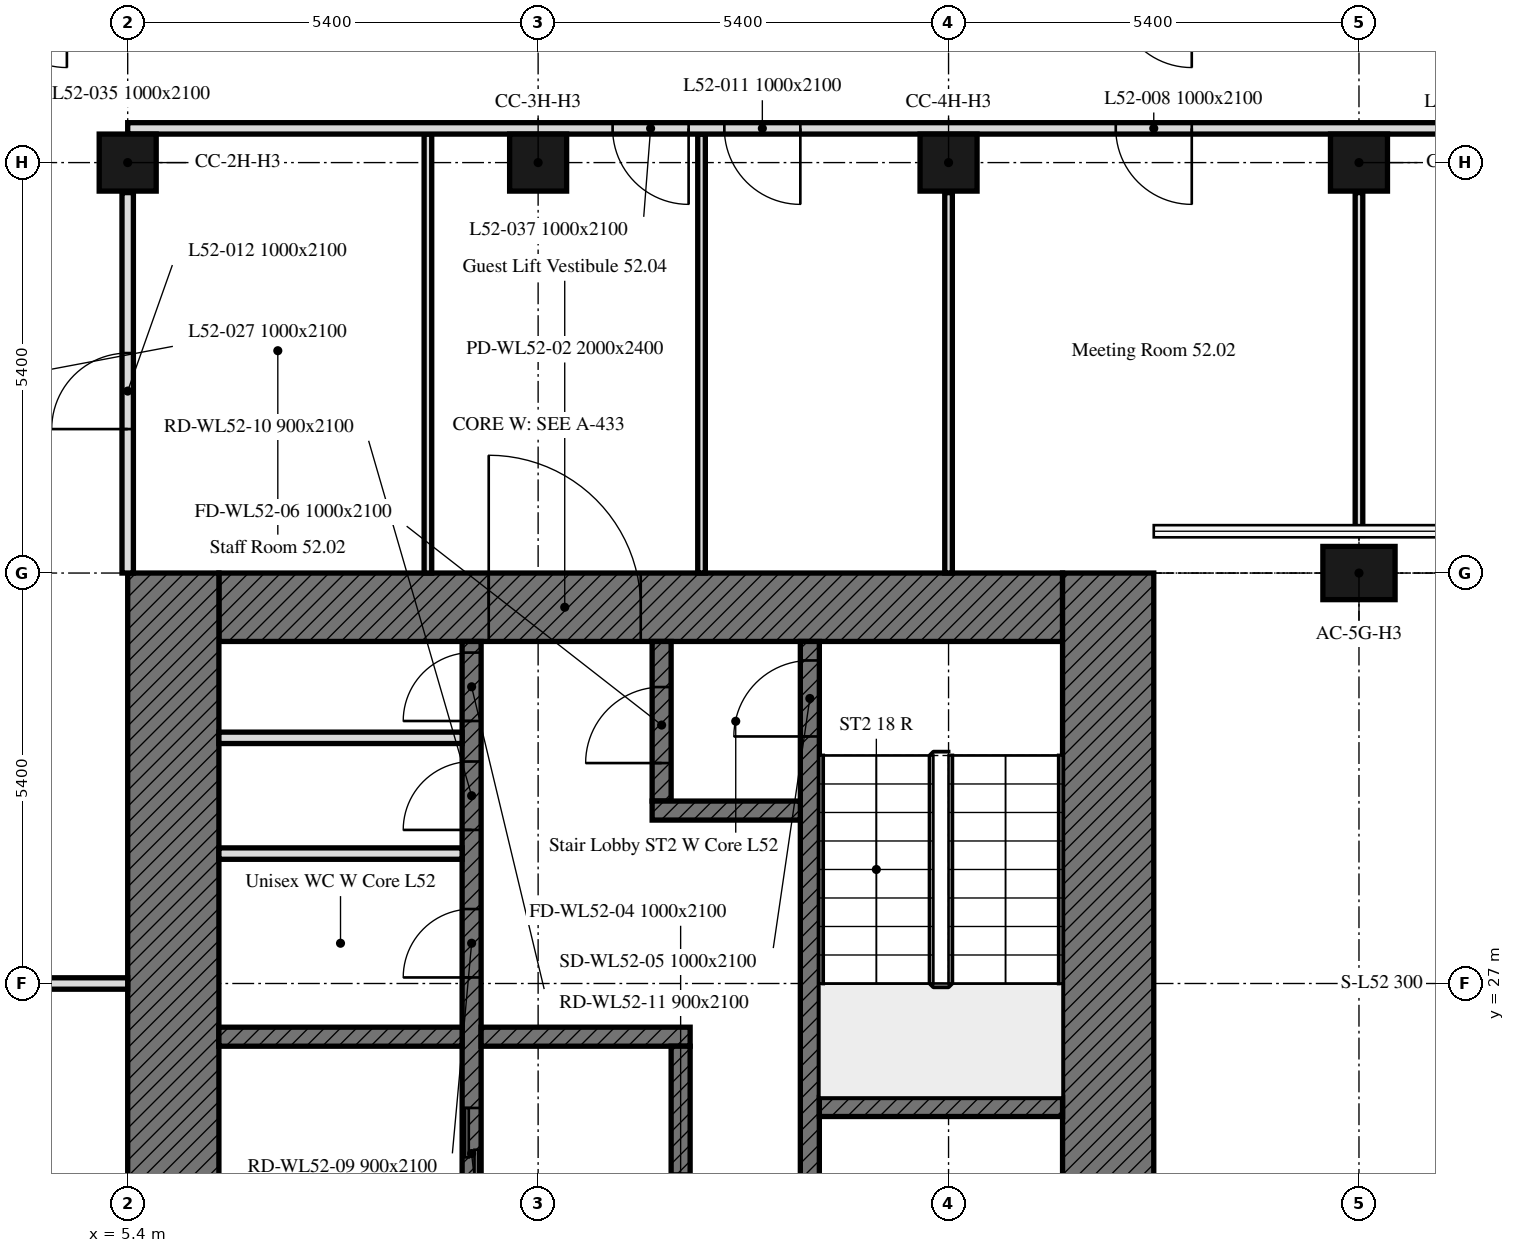
"""IFC4 building model, lengths in metres.
Left out: names, types, materials, properties, quantities, classifications, styles, units other than length and angle.
Written with IfcOpenShell. Run it as: python <this file> out.ifc"""

import sys

from ifc_helpers import new_model, si_unit, direction, frame, frame_2d, origin, origin_2d, place, context, subcontext, project, spatial, rectangle, extrude, element, fill, save


model = new_model("IFC4")
c1 = context("Model", 3, precision=1e-05, world=origin(), true_north=direction((0.0, 1.0)))
c2 = subcontext(c1, "Body", "Model", "MODEL_VIEW")
j1 = project(units=[si_unit("LENGTHUNIT", "METRE"), si_unit("PLANEANGLEUNIT", "RADIAN")], contexts=[c1])
p1 = place(None, origin())
s1 = spatial("IfcSite", under=j1, at=p1, CompositionType="ELEMENT")
p2 = place(p1, origin())
s2 = spatial("IfcBuilding", under=s1, at=p2, CompositionType="ELEMENT")
p3 = place(p2, frame((0.0, 0.0, 210.4)))
s3 = spatial("IfcBuildingStorey", under=s2, at=p3, CompositionType="ELEMENT", Elevation=210.4)
p4 = place(p3, frame((21.6, 32.4, 0.0), z_axis=(0.0, 0.0, 1.0), x_axis=(1.0, 0.0, 0.0)))
e1 = element("IfcColumn", 1, at=p4, inside=s3, PredefinedType="COLUMN", context=c2, shape_type="SweptSolid", body=[
    extrude(rectangle(XDim=0.95, YDim=0.7, at=origin_2d()), origin(), (0.0, 0.0, 1.0), 3.0),
])
for number, where, z_axis, x_axis in (
    (2, (5.4, 37.8, 0.0), (0.0, 0.0, 1.0), (1.0, 0.0, 0.0)),
    (3, (10.8, 37.8, 0.0), (0.0, 0.0, 1.0), (1.0, 0.0, 0.0)),
    (4, (16.2, 37.8, 0.0), (0.0, 0.0, 1.0), (1.0, 0.0, 0.0)),
    (5, (21.6, 37.8, 0.0), (0.0, 0.0, 1.0), (1.0, 0.0, 0.0)),
):
    element("IfcColumn", number, at=place(p3, frame(where, z_axis=z_axis, x_axis=x_axis)), inside=s3, PredefinedType="COLUMN", context=c2, shape_type="SweptSolid", body=[
        extrude(rectangle(XDim=0.75, YDim=0.75, at=origin_2d()), origin(), (0.0, 0.0, 1.0), 3.0),
    ])
p5 = place(p3, frame((6.6, 31.95, 0.0), z_axis=(0.0, 0.0, 1.0), x_axis=(1.0, 0.0, 0.0)))
e6 = element("IfcWall", 6, at=p5, inside=s3, PredefinedType="SOLIDWALL", context=c2, shape_type="SweptSolid", body=[
    extrude(rectangle(XDim=11.1, YDim=0.9, at=frame_2d((5.55, 0.0))), origin(), (0.0, 0.0, 1.0), 3.0),
])
p6 = place(p5, frame((3.55, 0.0, 0.0)))
e7 = element("IfcOpeningElement", 7, at=p6, cuts=e6, PredefinedType="OPENING", context=c2, shape_type="SweptSolid", body=[
    extrude(rectangle(XDim=2.0, YDim=2.4, at=frame_2d((1.0, 1.2))), frame((0.0, 0.45, 0.0), z_axis=(0.0, -1.0, 0.0), x_axis=(1.0, 0.0, 0.0)), (0.0, 0.0, 1.0), 0.9),
])
for number, where, z_axis, x_axis in (
    (8, (6.0, 16.2, 0.0), (0.0, 0.0, 1.0), (0.0, 1.0, 0.0)),
    (9, (18.3, 32.4, 0.0), (0.0, 0.0, 1.0), (0.0, -1.0, 0.0)),
):
    element("IfcWall", number, at=place(p3, frame(where, z_axis=z_axis, x_axis=x_axis)), inside=s3, PredefinedType="SOLIDWALL", context=c2, shape_type="SweptSolid", body=[
        extrude(rectangle(XDim=16.2, YDim=1.2, at=frame_2d((8.1, 0.0))), origin(), (0.0, 0.0, 1.0), 3.0),
    ])
p7 = place(p3, frame((9.925, 17.1, 0.0), z_axis=(0.0, 0.0, 1.0), x_axis=(0.0, 1.0, 0.0)))
e10 = element("IfcWall", 10, at=p7, inside=s3, PredefinedType="SOLIDWALL", context=c2, shape_type="SweptSolid", body=[
    extrude(rectangle(XDim=14.4, YDim=0.25, at=frame_2d((7.2, 0.0))), origin(), (0.0, 0.0, 1.0), 3.0),
])
p8 = place(p7, frame((4.6, 0.0, 0.0)))
e11 = element("IfcOpeningElement", 11, at=p8, cuts=e10, PredefinedType="OPENING", context=c2, shape_type="SweptSolid", body=[
    extrude(rectangle(XDim=1.0, YDim=2.1, at=frame_2d((0.5, 1.05))), frame((0.0, 0.125, 0.0), z_axis=(0.0, -1.0, 0.0), x_axis=(1.0, 0.0, 0.0)), (0.0, 0.0, 1.0), 0.25),
])
p9 = place(p7, frame((7.062, 0.0, 0.0)))
e12 = element("IfcOpeningElement", 12, at=p9, cuts=e10, PredefinedType="OPENING", context=c2, shape_type="SweptSolid", body=[
    extrude(rectangle(XDim=1.2, YDim=2.1, at=frame_2d((0.6, 1.05))), frame((0.0, 0.125, 0.0), z_axis=(0.0, -1.0, 0.0), x_axis=(1.0, 0.0, 0.0)), (0.0, 0.0, 1.0), 0.25),
])
p10 = place(p7, frame((9.979, 0.0, 0.0)))
e13 = element("IfcOpeningElement", 13, at=p10, cuts=e10, PredefinedType="OPENING", context=c2, shape_type="SweptSolid", body=[
    extrude(rectangle(XDim=0.9, YDim=2.1, at=frame_2d((0.45, 1.05))), frame((0.0, 0.125, 0.0), z_axis=(0.0, -1.0, 0.0), x_axis=(1.0, 0.0, 0.0)), (0.0, 0.0, 1.0), 0.25),
])
p11 = place(p7, frame((11.92, 0.0, 0.0)))
e14 = element("IfcOpeningElement", 14, at=p11, cuts=e10, PredefinedType="OPENING", context=c2, shape_type="SweptSolid", body=[
    extrude(rectangle(XDim=0.9, YDim=2.1, at=frame_2d((0.45, 1.05))), frame((0.0, 0.125, 0.0), z_axis=(0.0, -1.0, 0.0), x_axis=(1.0, 0.0, 0.0)), (0.0, 0.0, 1.0), 0.25),
])
p12 = place(p7, frame((13.354, 0.0, 0.0)))
e15 = element("IfcOpeningElement", 15, at=p12, cuts=e10, PredefinedType="OPENING", context=c2, shape_type="SweptSolid", body=[
    extrude(rectangle(XDim=0.9, YDim=2.1, at=frame_2d((0.45, 1.05))), frame((0.0, 0.125, 0.0), z_axis=(0.0, -1.0, 0.0), x_axis=(1.0, 0.0, 0.0)), (0.0, 0.0, 1.0), 0.25),
])
p13 = place(p3, frame((14.375, 17.1, 0.0), z_axis=(0.0, 0.0, 1.0), x_axis=(0.0, 1.0, 0.0)))
e16 = element("IfcWall", 16, at=p13, inside=s3, PredefinedType="SOLIDWALL", context=c2, shape_type="SweptSolid", body=[
    extrude(rectangle(XDim=14.4, YDim=0.25, at=frame_2d((7.2, 0.0))), origin(), (0.0, 0.0, 1.0), 3.0),
])
p14 = place(p13, frame((13.15, 0.0, 0.0)))
e17 = element("IfcOpeningElement", 17, at=p14, cuts=e16, PredefinedType="OPENING", context=c2, shape_type="SweptSolid", body=[
    extrude(rectangle(XDim=1.0, YDim=2.1, at=frame_2d((0.5, 1.05))), frame((0.0, 0.125, 0.0), z_axis=(0.0, -1.0, 0.0), x_axis=(1.0, 0.0, 0.0)), (0.0, 0.0, 1.0), 0.25),
])
p15 = place(p13, frame((0.6, 0.0, 0.0)))
e18 = element("IfcOpeningElement", 18, at=p15, cuts=e16, PredefinedType="OPENING", context=c2, shape_type="SweptSolid", body=[
    extrude(rectangle(XDim=1.1, YDim=2.1, at=frame_2d((0.55, 1.05))), frame((0.0, 0.125, 0.0), z_axis=(0.0, -1.0, 0.0), x_axis=(1.0, 0.0, 0.0)), (0.0, 0.0, 1.0), 0.25),
])
p16 = place(p13, frame((3.25, 0.0, 0.0)))
e19 = element("IfcOpeningElement", 19, at=p16, cuts=e16, PredefinedType="OPENING", context=c2, shape_type="SweptSolid", body=[
    extrude(rectangle(XDim=0.9, YDim=2.1, at=frame_2d((0.45, 1.05))), frame((0.0, 0.125, 0.0), z_axis=(0.0, -1.0, 0.0), x_axis=(1.0, 0.0, 0.0)), (0.0, 0.0, 1.0), 0.25),
])
for number, where, z_axis, x_axis in (
    (20, (14.5, 25.375, 0.0), (0.0, 0.0, 1.0), (1.0, 0.0, 0.0)),
    (21, (6.6, 26.3, 0.0), (0.0, 0.0, 1.0), (1.0, 0.0, 0.0)),
):
    element("IfcWall", number, at=place(p3, frame(where, z_axis=z_axis, x_axis=x_axis)), inside=s3, PredefinedType="SOLIDWALL", context=c2, shape_type="SweptSolid", body=[
        extrude(rectangle(XDim=3.2, YDim=0.25, at=frame_2d((1.6, 0.0))), origin(), (0.0, 0.0, 1.0), 3.0),
    ])
p17 = place(p3, frame((10.05, 26.3, 0.0), z_axis=(0.0, 0.0, 1.0), x_axis=(1.0, 0.0, 0.0)))
e22 = element("IfcWall", 22, at=p17, inside=s3, PredefinedType="SOLIDWALL", context=c2, shape_type="SweptSolid", body=[
    extrude(rectangle(XDim=2.75, YDim=0.25, at=frame_2d((1.375, 0.0))), origin(), (0.0, 0.0, 1.0), 3.0),
])
p18 = place(p3, frame((12.425, 29.4, 0.0), z_axis=(0.0, 0.0, 1.0), x_axis=(0.0, 1.0, 0.0)))
e23 = element("IfcWall", 23, at=p18, inside=s3, PredefinedType="SOLIDWALL", context=c2, shape_type="SweptSolid", body=[
    extrude(rectangle(XDim=2.1, YDim=0.25, at=frame_2d((1.05, 0.0))), origin(), (0.0, 0.0, 1.0), 3.0),
])
p19 = place(p18, frame((0.5, 0.0, 0.0)))
e24 = element("IfcOpeningElement", 24, at=p19, cuts=e23, PredefinedType="OPENING", context=c2, shape_type="SweptSolid", body=[
    extrude(rectangle(XDim=1.0, YDim=2.1, at=frame_2d((0.5, 1.05))), frame((0.0, 0.125, 0.0), z_axis=(0.0, -1.0, 0.0), x_axis=(1.0, 0.0, 0.0)), (0.0, 0.0, 1.0), 0.25),
])
p20 = place(p3, frame((12.3, 29.275, 0.0), z_axis=(0.0, 0.0, 1.0), x_axis=(1.0, 0.0, 0.0)))
e25 = element("IfcWall", 25, at=p20, inside=s3, PredefinedType="SOLIDWALL", context=c2, shape_type="SweptSolid", body=[
    extrude(rectangle(XDim=1.95, YDim=0.25, at=frame_2d((0.975, 0.0))), origin(), (0.0, 0.0, 1.0), 3.0),
])
p21 = place(p3, frame((12.675, 20.55, 0.0), z_axis=(0.0, 0.0, 1.0), x_axis=(0.0, 1.0, 0.0)))
e26 = element("IfcWall", 26, at=p21, inside=s3, PredefinedType="SOLIDWALL", context=c2, shape_type="SweptSolid", body=[
    extrude(rectangle(XDim=5.625, YDim=0.25, at=frame_2d((2.812, 0.0))), origin(), (0.0, 0.0, 1.0), 3.0),
])
p22 = place(p21, frame((2.95, 0.0, 0.0)))
e27 = element("IfcOpeningElement", 27, at=p22, cuts=e26, PredefinedType="OPENING", context=c2, shape_type="SweptSolid", body=[
    extrude(rectangle(XDim=1.0, YDim=2.1, at=frame_2d((0.5, 1.05))), frame((0.0, 0.125, 0.0), z_axis=(0.0, -1.0, 0.0), x_axis=(1.0, 0.0, 0.0)), (0.0, 0.0, 1.0), 0.25),
])
for number, where, z_axis, x_axis in (
    (28, (6.6, 28.709, 0.0), (0.0, 0.0, 1.0), (1.0, 0.0, 0.0)),
    (29, (6.6, 30.232, 0.0), (0.0, 0.0, 1.0), (1.0, 0.0, 0.0)),
):
    element("IfcWall", number, at=place(p3, frame(where, z_axis=z_axis, x_axis=x_axis)), inside=s3, PredefinedType="PARTITIONING", context=c2, shape_type="SweptSolid", body=[
        extrude(rectangle(XDim=3.2, YDim=0.15, at=frame_2d((1.6, 0.0))), origin(), (0.0, 0.0, 1.0), 3.0),
    ])
p23 = place(p3, frame((21.6, 37.405, 0.0), z_axis=(0.0, 0.0, 1.0), x_axis=(0.0, -1.0, 0.0)))
e30 = element("IfcWall", 30, at=p23, inside=s3, PredefinedType="PARTITIONING", context=c2, shape_type="SweptSolid", body=[
    extrude(rectangle(XDim=4.51, YDim=0.1, at=frame_2d((2.255, 0.0))), origin(), (0.0, 0.0, 1.0), 2.4),
])
p24 = place(p3, frame((16.2, 37.405, 0.0), z_axis=(0.0, 0.0, 1.0), x_axis=(0.0, -1.0, 0.0)))
e31 = element("IfcWall", 31, at=p24, inside=s3, PredefinedType="PARTITIONING", context=c2, shape_type="SweptSolid", body=[
    extrude(rectangle(XDim=5.005, YDim=0.1, at=frame_2d((2.502, 0.0))), origin(), (0.0, 0.0, 1.0), 2.4),
])
for number, where, z_axis, x_axis in (
    (32, (12.95, 32.4, 0.0), (0.0, 0.0, 1.0), (0.0, 1.0, 0.0)),
    (33, (9.35, 38.175, 0.0), (0.0, 0.0, 1.0), (0.0, -1.0, 0.0)),
):
    element("IfcWall", number, at=place(p3, frame(where, z_axis=z_axis, x_axis=x_axis)), inside=s3, PredefinedType="PARTITIONING", context=c2, shape_type="SweptSolid", body=[
        extrude(rectangle(XDim=5.775, YDim=0.1, at=frame_2d((2.888, 0.0))), origin(), (0.0, 0.0, 1.0), 2.4),
    ])
p25 = place(p3, frame((3.375, 27.0, 0.0), z_axis=(0.0, 0.0, 1.0), x_axis=(1.0, 0.0, 0.0)))
e34 = element("IfcWall", 34, at=p25, inside=s3, PredefinedType="PARTITIONING", context=c2, shape_type="SweptSolid", body=[
    extrude(rectangle(XDim=2.025, YDim=0.15, at=frame_2d((1.012, 0.0))), origin(), (0.0, 0.0, 1.0), 2.4),
])
p26 = place(p3, frame((5.4, 32.4, 0.0), z_axis=(0.0, 0.0, 1.0), x_axis=(0.0, 1.0, 0.0)))
e35 = element("IfcWall", 35, at=p26, inside=s3, PredefinedType="PARTITIONING", context=c2, shape_type="SweptSolid", body=[
    extrude(rectangle(XDim=5.005, YDim=0.15, at=frame_2d((2.502, 0.0))), origin(), (0.0, 0.0, 1.0), 3.0),
])
p27 = place(p26, frame((1.894, 0.0, 0.0)))
e36 = element("IfcOpeningElement", 36, at=p27, cuts=e35, PredefinedType="OPENING", context=c2, shape_type="SweptSolid", body=[
    extrude(rectangle(XDim=1.0, YDim=2.1, at=frame_2d((0.5, 1.05))), frame((0.0, 0.075, 0.0), z_axis=(0.0, -1.0, 0.0), x_axis=(1.0, 0.0, 0.0)), (0.0, 0.0, 1.0), 0.15),
])
p28 = place(p3, frame((42.449, 38.25, 0.0), z_axis=(0.0, 0.0, 1.0), x_axis=(-1.0, 0.0, 0.0)))
e37 = element("IfcWall", 37, at=p28, inside=s3, PredefinedType="PARTITIONING", context=c2, shape_type="SweptSolid", body=[
    extrude(rectangle(XDim=37.049, YDim=0.15, at=frame_2d((18.524, 0.0))), origin(), (0.0, 0.0, 1.0), 2.4),
])
p29 = place(p28, frame((12.266, 0.0, 0.0)))
e38 = element("IfcOpeningElement", 38, at=p29, cuts=e37, PredefinedType="OPENING", context=c2, shape_type="SweptSolid", body=[
    extrude(rectangle(XDim=1.0, YDim=2.1, at=frame_2d((0.5, 1.05))), frame((0.0, 0.075, 0.0), z_axis=(0.0, -1.0, 0.0), x_axis=(1.0, 0.0, 0.0)), (0.0, 0.0, 1.0), 0.15),
])
p30 = place(p28, frame((23.049, 0.0, 0.0)))
e39 = element("IfcOpeningElement", 39, at=p30, cuts=e37, PredefinedType="OPENING", context=c2, shape_type="SweptSolid", body=[
    extrude(rectangle(XDim=1.0, YDim=2.1, at=frame_2d((0.5, 1.05))), frame((0.0, 0.075, 0.0), z_axis=(0.0, -1.0, 0.0), x_axis=(1.0, 0.0, 0.0)), (0.0, 0.0, 1.0), 0.15),
])
p31 = place(p28, frame((1.409, 0.0, 0.0)))
e40 = element("IfcOpeningElement", 40, at=p31, cuts=e37, PredefinedType="OPENING", context=c2, shape_type="SweptSolid", body=[
    extrude(rectangle(XDim=1.0, YDim=2.1, at=frame_2d((0.5, 1.05))), frame((0.0, 0.075, 0.0), z_axis=(0.0, -1.0, 0.0), x_axis=(1.0, 0.0, 0.0)), (0.0, 0.0, 1.0), 0.15),
])
p32 = place(p28, frame((28.199, 0.0, 0.0)))
e41 = element("IfcOpeningElement", 41, at=p32, cuts=e37, PredefinedType="OPENING", context=c2, shape_type="SweptSolid", body=[
    extrude(rectangle(XDim=1.0, YDim=2.1, at=frame_2d((0.5, 1.05))), frame((0.0, 0.075, 0.0), z_axis=(0.0, -1.0, 0.0), x_axis=(1.0, 0.0, 0.0)), (0.0, 0.0, 1.0), 0.15),
])
p33 = place(p28, frame((7.099, 0.0, 0.0)))
e42 = element("IfcOpeningElement", 42, at=p33, cuts=e37, PredefinedType="OPENING", context=c2, shape_type="SweptSolid", body=[
    extrude(rectangle(XDim=1.0, YDim=2.1, at=frame_2d((0.5, 1.05))), frame((0.0, 0.075, 0.0), z_axis=(0.0, -1.0, 0.0), x_axis=(1.0, 0.0, 0.0)), (0.0, 0.0, 1.0), 0.15),
])
p34 = place(p28, frame((5.629, 0.0, 0.0)))
e43 = element("IfcOpeningElement", 43, at=p34, cuts=e37, PredefinedType="OPENING", context=c2, shape_type="SweptSolid", body=[
    extrude(rectangle(XDim=1.0, YDim=2.1, at=frame_2d((0.5, 1.05))), frame((0.0, 0.075, 0.0), z_axis=(0.0, -1.0, 0.0), x_axis=(1.0, 0.0, 0.0)), (0.0, 0.0, 1.0), 0.15),
])
p35 = place(p28, frame((29.669, 0.0, 0.0)))
e44 = element("IfcOpeningElement", 44, at=p35, cuts=e37, PredefinedType="OPENING", context=c2, shape_type="SweptSolid", body=[
    extrude(rectangle(XDim=1.0, YDim=2.1, at=frame_2d((0.5, 1.05))), frame((0.0, 0.075, 0.0), z_axis=(0.0, -1.0, 0.0), x_axis=(1.0, 0.0, 0.0)), (0.0, 0.0, 1.0), 0.15),
])
p36 = place(p6, origin())
e45 = element("IfcDoor", 45, at=p36, inside=s3, OperationType="DOUBLE_DOOR_SINGLE_SWING", PredefinedType="DOOR", context=c2, shape_type="SweptSolid", body=[
    extrude(rectangle(XDim=2.0, YDim=2.4, at=frame_2d((1.0, 1.2))), frame((0.0, 0.025, 0.0), z_axis=(0.0, -1.0, 0.0), x_axis=(1.0, 0.0, 0.0)), (0.0, 0.0, 1.0), 0.05),
])
fill(e7, e45)
p37 = place(p14, origin())
e46 = element("IfcDoor", 46, at=p37, inside=s3, OperationType="SINGLE_SWING_LEFT", PredefinedType="DOOR", context=c2, shape_type="SweptSolid", body=[
    extrude(rectangle(XDim=1.0, YDim=2.1, at=frame_2d((0.5, 1.05))), frame((0.0, 0.025, 0.0), z_axis=(0.0, -1.0, 0.0), x_axis=(1.0, 0.0, 0.0)), (0.0, 0.0, 1.0), 0.05),
])
fill(e17, e46)
p38 = place(p19, origin())
e47 = element("IfcDoor", 47, at=p38, inside=s3, OperationType="SINGLE_SWING_LEFT", PredefinedType="DOOR", context=c2, shape_type="SweptSolid", body=[
    extrude(rectangle(XDim=1.0, YDim=2.1, at=frame_2d((0.5, 1.05))), frame((0.0, 0.025, 0.0), z_axis=(0.0, -1.0, 0.0), x_axis=(1.0, 0.0, 0.0)), (0.0, 0.0, 1.0), 0.05),
])
fill(e24, e47)
p39 = place(p9, origin())
e48 = element("IfcDoor", 48, at=p39, inside=s3, OperationType="DOUBLE_DOOR_SLIDING", PredefinedType="DOOR", context=c2, shape_type="SweptSolid", body=[
    extrude(rectangle(XDim=1.2, YDim=2.1, at=frame_2d((0.6, 1.05))), frame((0.0, 0.025, 0.0), z_axis=(0.0, -1.0, 0.0), x_axis=(1.0, 0.0, 0.0)), (0.0, 0.0, 1.0), 0.05),
])
fill(e12, e48)
p40 = place(p10, origin())
e49 = element("IfcDoor", 49, at=p40, inside=s3, OperationType="SINGLE_SWING_LEFT", PredefinedType="DOOR", context=c2, shape_type="SweptSolid", body=[
    extrude(rectangle(XDim=0.9, YDim=2.1, at=frame_2d((0.45, 1.05))), frame((0.0, 0.025, 0.0), z_axis=(0.0, -1.0, 0.0), x_axis=(1.0, 0.0, 0.0)), (0.0, 0.0, 1.0), 0.05),
])
fill(e13, e49)
p41 = place(p11, origin())
e50 = element("IfcDoor", 50, at=p41, inside=s3, OperationType="SINGLE_SWING_LEFT", PredefinedType="DOOR", context=c2, shape_type="SweptSolid", body=[
    extrude(rectangle(XDim=0.9, YDim=2.1, at=frame_2d((0.45, 1.05))), frame((0.0, 0.025, 0.0), z_axis=(0.0, -1.0, 0.0), x_axis=(1.0, 0.0, 0.0)), (0.0, 0.0, 1.0), 0.05),
])
fill(e14, e50)
p42 = place(p12, origin())
e51 = element("IfcDoor", 51, at=p42, inside=s3, OperationType="SINGLE_SWING_LEFT", PredefinedType="DOOR", context=c2, shape_type="SweptSolid", body=[
    extrude(rectangle(XDim=0.9, YDim=2.1, at=frame_2d((0.45, 1.05))), frame((0.0, 0.025, 0.0), z_axis=(0.0, -1.0, 0.0), x_axis=(1.0, 0.0, 0.0)), (0.0, 0.0, 1.0), 0.05),
])
fill(e15, e51)
p43 = place(p30, origin())
e52 = element("IfcDoor", 52, at=p43, inside=s3, OperationType="SINGLE_SWING_LEFT", PredefinedType="DOOR", context=c2, shape_type="SweptSolid", body=[
    extrude(rectangle(XDim=1.0, YDim=2.1, at=frame_2d((0.5, 1.05))), frame((0.0, 0.025, 0.0), z_axis=(0.0, -1.0, 0.0), x_axis=(1.0, 0.0, 0.0)), (0.0, 0.0, 1.0), 0.05),
])
fill(e39, e52)
p44 = place(p32, origin())
e53 = element("IfcDoor", 53, at=p44, inside=s3, OperationType="SINGLE_SWING_LEFT", PredefinedType="DOOR", context=c2, shape_type="SweptSolid", body=[
    extrude(rectangle(XDim=1.0, YDim=2.1, at=frame_2d((0.5, 1.05))), frame((0.0, 0.025, 0.0), z_axis=(0.0, -1.0, 0.0), x_axis=(1.0, 0.0, 0.0)), (0.0, 0.0, 1.0), 0.05),
])
fill(e41, e53)
p45 = place(p27, origin())
e54 = element("IfcDoor", 54, at=p45, inside=s3, OperationType="SINGLE_SWING_RIGHT", PredefinedType="DOOR", context=c2, shape_type="SweptSolid", body=[
    extrude(rectangle(XDim=1.0, YDim=2.1, at=frame_2d((0.5, 1.05))), frame((0.0, 0.025, 0.0), z_axis=(0.0, -1.0, 0.0), x_axis=(1.0, 0.0, 0.0)), (0.0, 0.0, 1.0), 0.05),
])
fill(e36, e54)
p46 = place(p35, origin())
e55 = element("IfcDoor", 55, at=p46, inside=s3, OperationType="SINGLE_SWING_LEFT", PredefinedType="DOOR", context=c2, shape_type="SweptSolid", body=[
    extrude(rectangle(XDim=1.0, YDim=2.1, at=frame_2d((0.5, 1.05))), frame((0.0, 0.025, 0.0), z_axis=(0.0, -1.0, 0.0), x_axis=(1.0, 0.0, 0.0)), (0.0, 0.0, 1.0), 0.05),
])
fill(e44, e55)
save(model, sys.argv[1])
